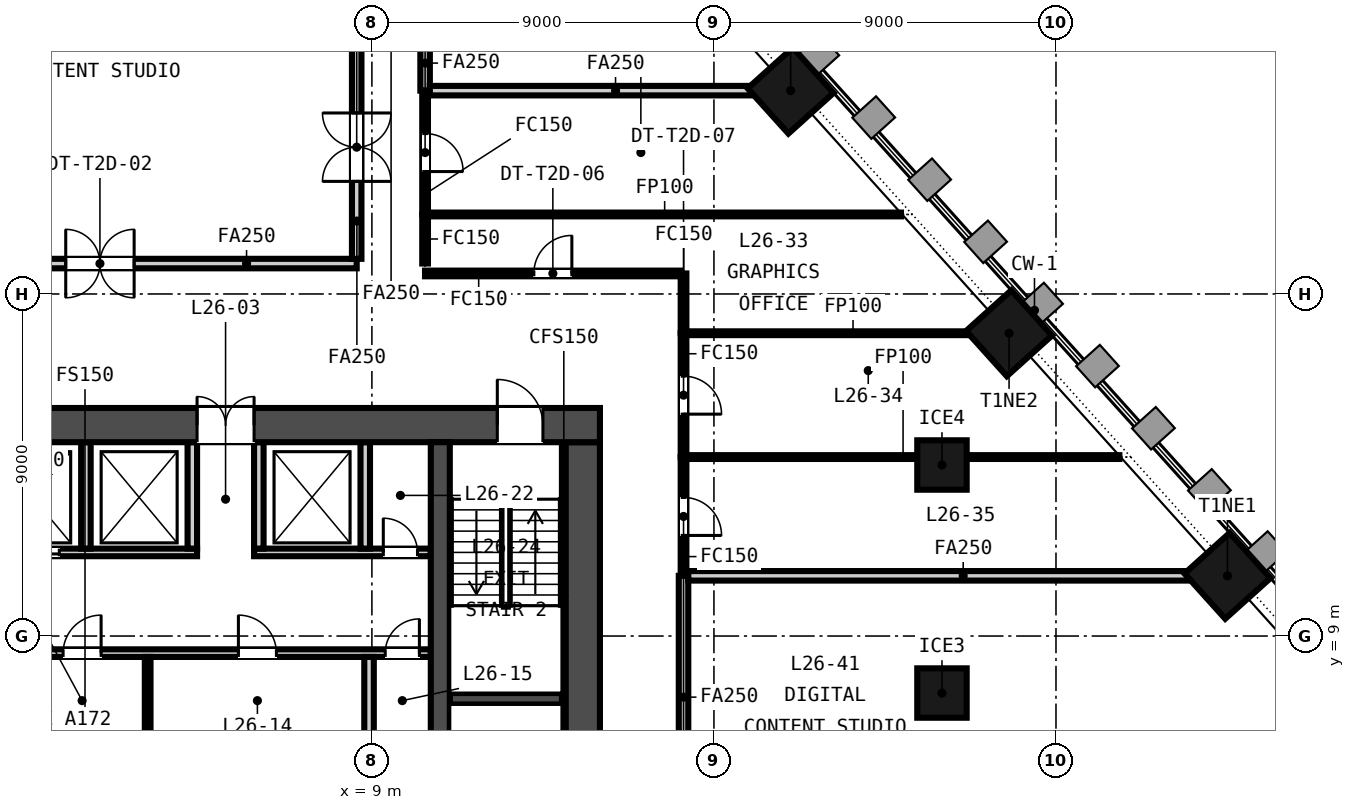
"""IFC4 building model, lengths in metres.
Left out: names, types, materials, properties, quantities, classifications, styles, units other than length and angle.
Written with IfcOpenShell. Run it as: python <this file> out.ifc"""

import sys

from ifc_helpers import new_model, si_unit, direction, frame, frame_2d, origin, origin_2d, place, context, subcontext, project, spatial, rectangle, extrude, element, fill, save


model = new_model("IFC4")
c1 = context("Model", 3, precision=1e-05, world=origin(), true_north=direction((0.0, 1.0)))
c2 = subcontext(c1, "Body", "Model", "MODEL_VIEW")
j1 = project(units=[si_unit("LENGTHUNIT", "METRE"), si_unit("PLANEANGLEUNIT", "RADIAN")], contexts=[c1])
p1 = place(None, origin())
s1 = spatial("IfcSite", under=j1, at=p1, CompositionType="ELEMENT")
p2 = place(p1, origin())
s2 = spatial("IfcBuilding", under=s1, at=p2, CompositionType="ELEMENT")
p3 = place(p2, frame((0.0, 0.0, 109.85)))
s3 = spatial("IfcBuildingStorey", under=s2, at=p3, CompositionType="ELEMENT", Elevation=109.85)
p4 = place(p3, frame((-15.0, 14.55, -0.15), z_axis=(0.0, 0.0, 1.0), x_axis=(1.0, 0.0, 0.0)))
e1 = element("IfcWall", 1, at=p4, inside=s3, PredefinedType="SOLIDWALL", context=c2, shape_type="SweptSolid", body=[
    extrude(rectangle(XDim=30.0, YDim=0.9, at=frame_2d((15.0, 0.0))), origin(), (0.0, 0.0, 1.0), 3.65),
])
p5 = place(p4, frame((9.25, 0.0, 0.15)))
e2 = element("IfcOpeningElement", 2, at=p5, cuts=e1, PredefinedType="OPENING", context=c2, shape_type="SweptSolid", body=[
    extrude(rectangle(XDim=1.5, YDim=2.1, at=frame_2d((0.75, 1.05))), frame((0.0, 0.46, 0.0), z_axis=(0.0, -1.0, 0.0), x_axis=(1.0, 0.0, 0.0)), (0.0, 0.0, 1.0), 0.92),
])
p6 = place(p4, frame((19.4, 0.0, 0.15)))
e3 = element("IfcOpeningElement", 3, at=p6, cuts=e1, PredefinedType="OPENING", context=c2, shape_type="SweptSolid", body=[
    extrude(rectangle(XDim=1.5, YDim=2.1, at=frame_2d((0.75, 1.05))), frame((0.0, 0.46, 0.0), z_axis=(0.0, -1.0, 0.0), x_axis=(1.0, 0.0, 0.0)), (0.0, 0.0, 1.0), 0.92),
])
p7 = place(p4, frame((1.5, 0.0, 0.15)))
e4 = element("IfcOpeningElement", 4, at=p7, cuts=e1, PredefinedType="OPENING", context=c2, shape_type="SweptSolid", body=[
    extrude(rectangle(XDim=1.2, YDim=2.1, at=frame_2d((0.6, 1.05))), frame((0.0, 0.46, 0.0), z_axis=(0.0, -1.0, 0.0), x_axis=(1.0, 0.0, 0.0)), (0.0, 0.0, 1.0), 0.92),
])
p8 = place(p4, frame((27.3, 0.0, 0.15)))
e5 = element("IfcOpeningElement", 5, at=p8, cuts=e1, PredefinedType="OPENING", context=c2, shape_type="SweptSolid", body=[
    extrude(rectangle(XDim=1.2, YDim=2.1, at=frame_2d((0.6, 1.05))), frame((0.0, 0.46, 0.0), z_axis=(0.0, -1.0, 0.0), x_axis=(1.0, 0.0, 0.0)), (0.0, 0.0, 1.0), 0.92),
])
p9 = place(p3, frame((14.55, 0.9, -0.15), z_axis=(0.0, 0.0, 1.0), x_axis=(0.0, 1.0, 0.0)))
e6 = element("IfcWall", 6, at=p9, inside=s3, PredefinedType="SOLIDWALL", context=c2, shape_type="SweptSolid", body=[
    extrude(rectangle(XDim=13.2, YDim=0.9, at=frame_2d((6.6, 0.0))), origin(), (0.0, 0.0, 1.0), 3.65),
])
p10 = place(p3, frame((10.8, 0.9, -0.15), z_axis=(0.0, 0.0, 1.0), x_axis=(0.0, 1.0, 0.0)))
e7 = element("IfcWall", 7, at=p10, inside=s3, PredefinedType="SOLIDWALL", context=c2, shape_type="SweptSolid", body=[
    extrude(rectangle(XDim=13.2, YDim=0.5, at=frame_2d((6.6, 0.0))), origin(), (0.0, 0.0, 1.0), 3.65),
])
for number, where, z_axis, x_axis in (
    (8, (31.513, 10.584, -0.15), (0.0, 0.0, 1.0), (-0.669, 0.743, 0.0)),
    (9, (25.765, 16.967, -0.15), (0.0, 0.0, 1.0), (-0.669, 0.743, 0.0)),
    (10, (20.018, 23.35, -0.15), (0.0, 0.0, 1.0), (-0.669, 0.743, 0.0)),
):
    element("IfcColumn", number, at=place(p3, frame(where, z_axis=z_axis, x_axis=x_axis)), inside=s3, PredefinedType="COLUMN", context=c2, shape_type="SweptSolid", body=[
        extrude(rectangle(XDim=1.6, YDim=1.6, at=origin_2d()), origin(), (0.0, 0.0, 1.0), 3.65),
    ])
for number, where, z_axis, x_axis in (
    (11, (24.0, 7.5, -0.15), (0.0, 0.0, 1.0), (1.0, 0.0, 0.0)),
    (12, (24.0, 13.5, -0.15), (0.0, 0.0, 1.0), (1.0, 0.0, 0.0)),
):
    element("IfcColumn", number, at=place(p3, frame(where, z_axis=z_axis, x_axis=x_axis)), inside=s3, PredefinedType="COLUMN", context=c2, shape_type="SweptSolid", body=[
        extrude(rectangle(XDim=1.3, YDim=1.3, at=origin_2d()), origin(), (0.0, 0.0, 1.0), 3.65),
    ])
p11 = place(p3, frame((-4.125, 8.55, 0.0), z_axis=(0.0, 0.0, 1.0), x_axis=(1.0, 0.0, 0.0)))
e13 = element("IfcWall", 13, at=p11, inside=s3, PredefinedType="PARTITIONING", context=c2, shape_type="SweptSolid", body=[
    extrude(rectangle(XDim=14.675, YDim=0.2, at=frame_2d((7.337, 0.0))), origin(), (0.0, 0.0, 1.0), 3.5),
])
p12 = place(p11, frame((1.413, 0.0, 0.0)))
e14 = element("IfcOpeningElement", 14, at=p12, cuts=e13, PredefinedType="OPENING", context=c2, shape_type="SweptSolid", body=[
    extrude(rectangle(XDim=1.0, YDim=2.1, at=frame_2d((0.5, 1.05))), frame((0.0, 0.11, 0.0), z_axis=(0.0, -1.0, 0.0), x_axis=(1.0, 0.0, 0.0)), (0.0, 0.0, 1.0), 0.22),
])
p13 = place(p11, frame((5.0, 0.0, 0.0)))
e15 = element("IfcOpeningElement", 15, at=p13, cuts=e13, PredefinedType="OPENING", context=c2, shape_type="SweptSolid", body=[
    extrude(rectangle(XDim=1.0, YDim=2.1, at=frame_2d((0.5, 1.05))), frame((0.0, 0.11, 0.0), z_axis=(0.0, -1.0, 0.0), x_axis=(1.0, 0.0, 0.0)), (0.0, 0.0, 1.0), 0.22),
])
p14 = place(p11, frame((9.613, 0.0, 0.0)))
e16 = element("IfcOpeningElement", 16, at=p14, cuts=e13, PredefinedType="OPENING", context=c2, shape_type="SweptSolid", body=[
    extrude(rectangle(XDim=1.0, YDim=2.1, at=frame_2d((0.5, 1.05))), frame((0.0, 0.11, 0.0), z_axis=(0.0, -1.0, 0.0), x_axis=(1.0, 0.0, 0.0)), (0.0, 0.0, 1.0), 0.22),
])
p15 = place(p11, frame((13.475, 0.0, 0.0)))
e17 = element("IfcOpeningElement", 17, at=p15, cuts=e13, PredefinedType="OPENING", context=c2, shape_type="SweptSolid", body=[
    extrude(rectangle(XDim=0.9, YDim=2.1, at=frame_2d((0.45, 1.05))), frame((0.0, 0.11, 0.0), z_axis=(0.0, -1.0, 0.0), x_axis=(1.0, 0.0, 0.0)), (0.0, 0.0, 1.0), 0.22),
])
p16 = place(p3, frame((-4.25, 11.2, 0.0), z_axis=(0.0, 0.0, 1.0), x_axis=(1.0, 0.0, 0.0)))
e18 = element("IfcWall", 18, at=p16, inside=s3, PredefinedType="PARTITIONING", context=c2, shape_type="SweptSolid", body=[
    extrude(rectangle(XDim=8.65, YDim=0.2, at=frame_2d((4.325, 0.0))), origin(), (0.0, 0.0, 1.0), 3.5),
])
p17 = place(p16, frame((0.825, 0.0, 0.0)))
e19 = element("IfcOpeningElement", 19, at=p17, cuts=e18, PredefinedType="OPENING", context=c2, shape_type="SweptSolid", body=[
    extrude(rectangle(XDim=1.4, YDim=2.1, at=frame_2d((0.7, 1.05))), frame((0.0, 0.11, 0.0), z_axis=(0.0, -1.0, 0.0), x_axis=(1.0, 0.0, 0.0)), (0.0, 0.0, 1.0), 0.22),
])
p18 = place(p16, frame((3.625, 0.0, 0.0)))
e20 = element("IfcOpeningElement", 20, at=p18, cuts=e18, PredefinedType="OPENING", context=c2, shape_type="SweptSolid", body=[
    extrude(rectangle(XDim=1.4, YDim=2.1, at=frame_2d((0.7, 1.05))), frame((0.0, 0.11, 0.0), z_axis=(0.0, -1.0, 0.0), x_axis=(1.0, 0.0, 0.0)), (0.0, 0.0, 1.0), 0.22),
])
p19 = place(p3, frame((5.9, 11.2, 0.0), z_axis=(0.0, 0.0, 1.0), x_axis=(1.0, 0.0, 0.0)))
e21 = element("IfcWall", 21, at=p19, inside=s3, PredefinedType="PARTITIONING", context=c2, shape_type="SweptSolid", body=[
    extrude(rectangle(XDim=4.65, YDim=0.2, at=frame_2d((2.325, 0.0))), origin(), (0.0, 0.0, 1.0), 3.5),
])
p20 = place(p19, frame((3.4, 0.0, 0.0)))
e22 = element("IfcOpeningElement", 22, at=p20, cuts=e21, PredefinedType="OPENING", context=c2, shape_type="SweptSolid", body=[
    extrude(rectangle(XDim=0.9, YDim=2.1, at=frame_2d((0.45, 1.05))), frame((0.0, 0.11, 0.0), z_axis=(0.0, -1.0, 0.0), x_axis=(1.0, 0.0, 0.0)), (0.0, 0.0, 1.0), 0.22),
])
p21 = place(p3, frame((3.1, 6.15, 0.0), z_axis=(0.0, 0.0, 1.0), x_axis=(0.0, 1.0, 0.0)))
e23 = element("IfcWall", 23, at=p21, inside=s3, PredefinedType="PARTITIONING", context=c2, shape_type="SweptSolid", body=[
    extrude(rectangle(XDim=2.3, YDim=0.15, at=frame_2d((1.15, 0.0))), origin(), (0.0, 0.0, 1.0), 3.5),
])
p22 = place(p3, frame((8.925, 6.15, 0.0), z_axis=(0.0, 0.0, 1.0), x_axis=(0.0, 1.0, 0.0)))
e24 = element("IfcWall", 24, at=p22, inside=s3, PredefinedType="PARTITIONING", context=c2, shape_type="SweptSolid", body=[
    extrude(rectangle(XDim=2.3, YDim=0.25, at=frame_2d((1.15, 0.0))), origin(), (0.0, 0.0, 1.0), 3.5),
])
for number, where, z_axis, x_axis in (
    (25, (1.475, 11.3, 0.0), (0.0, 0.0, 1.0), (0.0, 1.0, 0.0)),
    (26, (4.275, 11.3, 0.0), (0.0, 0.0, 1.0), (0.0, 1.0, 0.0)),
    (27, (6.025, 11.3, 0.0), (0.0, 0.0, 1.0), (0.0, 1.0, 0.0)),
    (28, (8.825, 11.3, 0.0), (0.0, 0.0, 1.0), (0.0, 1.0, 0.0)),
):
    element("IfcWall", number, at=place(p3, frame(where, z_axis=z_axis, x_axis=x_axis)), inside=s3, PredefinedType="PARTITIONING", context=c2, shape_type="SweptSolid", body=[
        extrude(rectangle(XDim=2.8, YDim=0.25, at=frame_2d((1.4, 0.0))), origin(), (0.0, 0.0, 1.0), 3.5),
    ])
p23 = place(p3, frame((11.05, 7.35, 0.0), z_axis=(0.0, 0.0, 1.0), x_axis=(1.0, 0.0, 0.0)))
e29 = element("IfcWall", 29, at=p23, inside=s3, PredefinedType="SOLIDWALL", context=c2, shape_type="SweptSolid", body=[
    extrude(rectangle(XDim=2.95, YDim=0.3, at=frame_2d((1.475, 0.0))), origin(), (0.0, 0.0, 1.0), 3.5),
])
p24 = place(p3, frame((14.05, 0.9, 0.0), z_axis=(0.0, 0.0, 1.0), x_axis=(0.0, 1.0, 0.0)))
e30 = element("IfcWall", 30, at=p24, inside=s3, PredefinedType="SOLIDWALL", context=c2, shape_type="SweptSolid", body=[
    extrude(rectangle(XDim=13.2, YDim=0.1, at=frame_2d((6.6, 0.0))), origin(), (0.0, 0.0, 1.0), 3.5),
])
p25 = place(p3, frame((10.4, 24.8, 0.0), z_axis=(0.0, 0.0, 1.0), x_axis=(0.0, -1.0, 0.0)))
e31 = element("IfcWall", 31, at=p25, inside=s3, PredefinedType="PARTITIONING", context=c2, shape_type="SweptSolid", body=[
    extrude(rectangle(XDim=1.45, YDim=0.25, at=frame_2d((0.725, 0.0))), origin(), (0.0, 0.0, 1.0), 2.741),
])
p26 = place(p3, frame((10.4, 23.35, 0.0), z_axis=(0.0, 0.0, 1.0), x_axis=(0.0, -1.0, 0.0)))
e32 = element("IfcWall", 32, at=p26, inside=s3, PredefinedType="PARTITIONING", context=c2, shape_type="SweptSolid", body=[
    extrude(rectangle(XDim=3.258, YDim=0.15, at=frame_2d((1.629, 0.0))), origin(), (0.0, 0.0, 1.0), 2.741),
])
p27 = place(p26, frame((1.129, 0.0, 0.0)))
e33 = element("IfcOpeningElement", 33, at=p27, cuts=e32, PredefinedType="OPENING", context=c2, shape_type="SweptSolid", body=[
    extrude(rectangle(XDim=1.0, YDim=2.1, at=frame_2d((0.5, 1.05))), frame((0.0, 0.085, 0.0), z_axis=(0.0, -1.0, 0.0), x_axis=(1.0, 0.0, 0.0)), (0.0, 0.0, 1.0), 0.17),
])
p28 = place(p3, frame((10.4, 20.092, 0.0), z_axis=(0.0, 0.0, 1.0), x_axis=(0.0, -1.0, 0.0)))
e34 = element("IfcWall", 34, at=p28, inside=s3, PredefinedType="PARTITIONING", context=c2, shape_type="SweptSolid", body=[
    extrude(rectangle(XDim=1.29, YDim=0.15, at=frame_2d((0.645, 0.0))), origin(), (0.0, 0.0, 1.0), 2.741),
])
p29 = place(p3, frame((17.2, 18.54, 0.0), z_axis=(0.0, 0.0, 1.0), x_axis=(0.0, -1.0, 0.0)))
e35 = element("IfcWall", 35, at=p29, inside=s3, PredefinedType="PARTITIONING", context=c2, shape_type="SweptSolid", body=[
    extrude(rectangle(XDim=1.573, YDim=0.15, at=frame_2d((0.787, 0.0))), origin(), (0.0, 0.0, 1.0), 2.741),
])
p30 = place(p3, frame((17.2, 16.967, 0.0), z_axis=(0.0, 0.0, 1.0), x_axis=(0.0, -1.0, 0.0)))
e36 = element("IfcWall", 36, at=p30, inside=s3, PredefinedType="PARTITIONING", context=c2, shape_type="SweptSolid", body=[
    extrude(rectangle(XDim=3.258, YDim=0.15, at=frame_2d((1.629, 0.0))), origin(), (0.0, 0.0, 1.0), 2.741),
])
p31 = place(p30, frame((1.129, 0.0, 0.0)))
e37 = element("IfcOpeningElement", 37, at=p31, cuts=e36, PredefinedType="OPENING", context=c2, shape_type="SweptSolid", body=[
    extrude(rectangle(XDim=1.0, YDim=2.1, at=frame_2d((0.5, 1.05))), frame((0.0, 0.085, 0.0), z_axis=(0.0, -1.0, 0.0), x_axis=(1.0, 0.0, 0.0)), (0.0, 0.0, 1.0), 0.17),
])
p32 = place(p3, frame((17.2, 13.709, 0.0), z_axis=(0.0, 0.0, 1.0), x_axis=(0.0, -1.0, 0.0)))
e38 = element("IfcWall", 38, at=p32, inside=s3, PredefinedType="PARTITIONING", context=c2, shape_type="SweptSolid", body=[
    extrude(rectangle(XDim=3.125, YDim=0.15, at=frame_2d((1.562, 0.0))), origin(), (0.0, 0.0, 1.0), 2.741),
])
p33 = place(p32, frame((1.062, 0.0, 0.0)))
e39 = element("IfcOpeningElement", 39, at=p33, cuts=e38, PredefinedType="OPENING", context=c2, shape_type="SweptSolid", body=[
    extrude(rectangle(XDim=1.0, YDim=2.1, at=frame_2d((0.5, 1.05))), frame((0.0, 0.085, 0.0), z_axis=(0.0, -1.0, 0.0), x_axis=(1.0, 0.0, 0.0)), (0.0, 0.0, 1.0), 0.17),
])
p34 = place(p3, frame((17.2, 10.584, 0.0), z_axis=(0.0, 0.0, 1.0), x_axis=(0.0, -1.0, 0.0)))
e40 = element("IfcWall", 40, at=p34, inside=s3, PredefinedType="PARTITIONING", context=c2, shape_type="SweptSolid", body=[
    extrude(rectangle(XDim=6.384, YDim=0.25, at=frame_2d((3.192, 0.0))), origin(), (0.0, 0.0, 1.0), 2.741),
])
p35 = place(p3, frame((-4.912, 18.8, 0.0), z_axis=(0.0, 0.0, 1.0), x_axis=(1.0, 0.0, 0.0)))
e41 = element("IfcWall", 41, at=p35, inside=s3, PredefinedType="PARTITIONING", context=c2, shape_type="SweptSolid", body=[
    extrude(rectangle(XDim=13.512, YDim=0.25, at=frame_2d((6.756, 0.0))), origin(), (0.0, 0.0, 1.0), 2.741),
])
p36 = place(p35, frame((5.856, 0.0, 0.0)))
e42 = element("IfcOpeningElement", 42, at=p36, cuts=e41, PredefinedType="OPENING", context=c2, shape_type="SweptSolid", body=[
    extrude(rectangle(XDim=1.8, YDim=2.1, at=frame_2d((0.9, 1.05))), frame((0.0, 0.135, 0.0), z_axis=(0.0, -1.0, 0.0), x_axis=(1.0, 0.0, 0.0)), (0.0, 0.0, 1.0), 0.27),
])
p37 = place(p3, frame((8.6, 18.925, 0.0), z_axis=(0.0, 0.0, 1.0), x_axis=(0.0, 1.0, 0.0)))
e43 = element("IfcWall", 43, at=p37, inside=s3, PredefinedType="PARTITIONING", context=c2, shape_type="SweptSolid", body=[
    extrude(rectangle(XDim=5.875, YDim=0.25, at=frame_2d((2.938, 0.0))), origin(), (0.0, 0.0, 1.0), 2.741),
])
p38 = place(p37, frame((2.038, 0.0, 0.0)))
e44 = element("IfcOpeningElement", 44, at=p38, cuts=e43, PredefinedType="OPENING", context=c2, shape_type="SweptSolid", body=[
    extrude(rectangle(XDim=1.8, YDim=2.1, at=frame_2d((0.9, 1.05))), frame((0.0, 0.135, 0.0), z_axis=(0.0, -1.0, 0.0), x_axis=(1.0, 0.0, 0.0)), (0.0, 0.0, 1.0), 0.27),
])
p39 = place(p3, frame((10.525, 23.35, 0.0), z_axis=(0.0, 0.0, 1.0), x_axis=(1.0, 0.0, 0.0)))
e45 = element("IfcWall", 45, at=p39, inside=s3, PredefinedType="PARTITIONING", context=c2, shape_type="SweptSolid", body=[
    extrude(rectangle(XDim=9.762, YDim=0.25, at=frame_2d((4.881, 0.0))), origin(), (0.0, 0.0, 1.0), 2.741),
])
p40 = place(p3, frame((10.475, 20.092, 0.0), z_axis=(0.0, 0.0, 1.0), x_axis=(1.0, 0.0, 0.0)))
e46 = element("IfcWall", 46, at=p40, inside=s3, PredefinedType="PARTITIONING", context=c2, shape_type="SweptSolid", body=[
    extrude(rectangle(XDim=12.446, YDim=0.1, at=frame_2d((6.223, 0.0))), origin(), (0.0, 0.0, 1.0), 2.741),
])
p41 = place(p3, frame((10.398, 18.54, 0.0), z_axis=(0.0, 0.0, 1.0), x_axis=(1.0, 0.0, 0.0)))
e47 = element("IfcWall", 47, at=p41, inside=s3, PredefinedType="PARTITIONING", context=c2, shape_type="SweptSolid", body=[
    extrude(rectangle(XDim=6.727, YDim=0.15, at=frame_2d((3.364, 0.0))), origin(), (0.0, 0.0, 1.0), 2.741),
])
p42 = place(p41, frame((2.864, 0.0, 0.0)))
e48 = element("IfcOpeningElement", 48, at=p42, cuts=e47, PredefinedType="OPENING", context=c2, shape_type="SweptSolid", body=[
    extrude(rectangle(XDim=1.0, YDim=2.1, at=frame_2d((0.5, 1.05))), frame((0.0, 0.085, 0.0), z_axis=(0.0, -1.0, 0.0), x_axis=(1.0, 0.0, 0.0)), (0.0, 0.0, 1.0), 0.17),
])
p43 = place(p3, frame((17.275, 16.967, 0.0), z_axis=(0.0, 0.0, 1.0), x_axis=(1.0, 0.0, 0.0)))
e49 = element("IfcWall", 49, at=p43, inside=s3, PredefinedType="PARTITIONING", context=c2, shape_type="SweptSolid", body=[
    extrude(rectangle(XDim=8.76, YDim=0.1, at=frame_2d((4.38, 0.0))), origin(), (0.0, 0.0, 1.0), 2.741),
])
p44 = place(p3, frame((17.275, 13.709, 0.0), z_axis=(0.0, 0.0, 1.0), x_axis=(1.0, 0.0, 0.0)))
e50 = element("IfcWall", 50, at=p44, inside=s3, PredefinedType="PARTITIONING", context=c2, shape_type="SweptSolid", body=[
    extrude(rectangle(XDim=11.393, YDim=0.1, at=frame_2d((5.697, 0.0))), origin(), (0.0, 0.0, 1.0), 2.741),
])
p45 = place(p3, frame((17.325, 10.584, 0.0), z_axis=(0.0, 0.0, 1.0), x_axis=(1.0, 0.0, 0.0)))
e51 = element("IfcWall", 51, at=p45, inside=s3, PredefinedType="PARTITIONING", context=c2, shape_type="SweptSolid", body=[
    extrude(rectangle(XDim=14.457, YDim=0.25, at=frame_2d((7.229, 0.0))), origin(), (0.0, 0.0, 1.0), 2.741),
])
p46 = place(p13, origin())
e52 = element("IfcDoor", 52, at=p46, inside=s3, OperationType="SINGLE_SWING_RIGHT", PredefinedType="DOOR", context=c2, shape_type="SweptSolid", body=[
    extrude(rectangle(XDim=1.0, YDim=2.1, at=frame_2d((0.5, 1.05))), frame((0.0, 0.025, 0.0), z_axis=(0.0, -1.0, 0.0), x_axis=(1.0, 0.0, 0.0)), (0.0, 0.0, 1.0), 0.05),
])
fill(e15, e52)
p47 = place(p14, origin())
e53 = element("IfcDoor", 53, at=p47, inside=s3, OperationType="SINGLE_SWING_LEFT", PredefinedType="DOOR", context=c2, shape_type="SweptSolid", body=[
    extrude(rectangle(XDim=1.0, YDim=2.1, at=frame_2d((0.5, 1.05))), frame((0.0, 0.025, 0.0), z_axis=(0.0, -1.0, 0.0), x_axis=(1.0, 0.0, 0.0)), (0.0, 0.0, 1.0), 0.05),
])
fill(e16, e53)
p48 = place(p15, origin())
e54 = element("IfcDoor", 54, at=p48, inside=s3, OperationType="SINGLE_SWING_RIGHT", PredefinedType="DOOR", context=c2, shape_type="SweptSolid", body=[
    extrude(rectangle(XDim=0.9, YDim=2.1, at=frame_2d((0.45, 1.05))), frame((0.0, 0.025, 0.0), z_axis=(0.0, -1.0, 0.0), x_axis=(1.0, 0.0, 0.0)), (0.0, 0.0, 1.0), 0.05),
])
fill(e17, e54)
p49 = place(p18, origin())
e55 = element("IfcDoor", 55, at=p49, inside=s3, OperationType="DOUBLE_DOOR_SLIDING", PredefinedType="DOOR", context=c2, shape_type="SweptSolid", body=[
    extrude(rectangle(XDim=1.4, YDim=2.1, at=frame_2d((0.7, 1.05))), frame((0.0, 0.025, 0.0), z_axis=(0.0, -1.0, 0.0), x_axis=(1.0, 0.0, 0.0)), (0.0, 0.0, 1.0), 0.05),
])
fill(e20, e55)
p50 = place(p20, origin())
e56 = element("IfcDoor", 56, at=p50, inside=s3, OperationType="SINGLE_SWING_LEFT", PredefinedType="DOOR", context=c2, shape_type="SweptSolid", body=[
    extrude(rectangle(XDim=0.9, YDim=2.1, at=frame_2d((0.45, 1.05))), frame((0.0, 0.025, 0.0), z_axis=(0.0, -1.0, 0.0), x_axis=(1.0, 0.0, 0.0)), (0.0, 0.0, 1.0), 0.05),
])
fill(e22, e56)
p51 = place(p6, origin())
e57 = element("IfcDoor", 57, at=p51, inside=s3, OperationType="DOUBLE_DOOR_SINGLE_SWING", PredefinedType="DOOR", context=c2, shape_type="SweptSolid", body=[
    extrude(rectangle(XDim=1.5, YDim=2.1, at=frame_2d((0.75, 1.05))), frame((0.0, 0.025, 0.0), z_axis=(0.0, -1.0, 0.0), x_axis=(1.0, 0.0, 0.0)), (0.0, 0.0, 1.0), 0.05),
])
fill(e3, e57)
p52 = place(p8, origin())
e58 = element("IfcDoor", 58, at=p52, inside=s3, OperationType="SINGLE_SWING_LEFT", PredefinedType="DOOR", context=c2, shape_type="SweptSolid", body=[
    extrude(rectangle(XDim=1.2, YDim=2.1, at=frame_2d((0.6, 1.05))), frame((0.0, 0.025, 0.0), z_axis=(0.0, -1.0, 0.0), x_axis=(1.0, 0.0, 0.0)), (0.0, 0.0, 1.0), 0.05),
])
fill(e5, e58)
p53 = place(p36, origin())
e59 = element("IfcDoor", 59, at=p53, inside=s3, OperationType="DOUBLE_DOOR_DOUBLE_SWING", PredefinedType="DOOR", context=c2, shape_type="SweptSolid", body=[
    extrude(rectangle(XDim=1.8, YDim=2.1, at=frame_2d((0.9, 1.05))), frame((0.0, 0.025, 0.0), z_axis=(0.0, -1.0, 0.0), x_axis=(1.0, 0.0, 0.0)), (0.0, 0.0, 1.0), 0.05),
])
fill(e42, e59)
p54 = place(p38, origin())
e60 = element("IfcDoor", 60, at=p54, inside=s3, OperationType="DOUBLE_DOOR_DOUBLE_SWING", PredefinedType="DOOR", context=c2, shape_type="SweptSolid", body=[
    extrude(rectangle(XDim=1.8, YDim=2.1, at=frame_2d((0.9, 1.05))), frame((0.0, 0.025, 0.0), z_axis=(0.0, -1.0, 0.0), x_axis=(1.0, 0.0, 0.0)), (0.0, 0.0, 1.0), 0.05),
])
fill(e44, e60)
p55 = place(p27, origin())
e61 = element("IfcDoor", 61, at=p55, inside=s3, OperationType="SINGLE_SWING_RIGHT", PredefinedType="DOOR", context=c2, shape_type="SweptSolid", body=[
    extrude(rectangle(XDim=1.0, YDim=2.1, at=frame_2d((0.5, 1.05))), frame((0.0, 0.025, 0.0), z_axis=(0.0, -1.0, 0.0), x_axis=(1.0, 0.0, 0.0)), (0.0, 0.0, 1.0), 0.05),
])
fill(e33, e61)
p56 = place(p42, origin())
e62 = element("IfcDoor", 62, at=p56, inside=s3, OperationType="SINGLE_SWING_RIGHT", PredefinedType="DOOR", context=c2, shape_type="SweptSolid", body=[
    extrude(rectangle(XDim=1.0, YDim=2.1, at=frame_2d((0.5, 1.05))), frame((0.0, 0.025, 0.0), z_axis=(0.0, -1.0, 0.0), x_axis=(1.0, 0.0, 0.0)), (0.0, 0.0, 1.0), 0.05),
])
fill(e48, e62)
p57 = place(p31, origin())
e63 = element("IfcDoor", 63, at=p57, inside=s3, OperationType="SINGLE_SWING_RIGHT", PredefinedType="DOOR", context=c2, shape_type="SweptSolid", body=[
    extrude(rectangle(XDim=1.0, YDim=2.1, at=frame_2d((0.5, 1.05))), frame((0.0, 0.025, 0.0), z_axis=(0.0, -1.0, 0.0), x_axis=(1.0, 0.0, 0.0)), (0.0, 0.0, 1.0), 0.05),
])
fill(e37, e63)
p58 = place(p33, origin())
e64 = element("IfcDoor", 64, at=p58, inside=s3, OperationType="SINGLE_SWING_RIGHT", PredefinedType="DOOR", context=c2, shape_type="SweptSolid", body=[
    extrude(rectangle(XDim=1.0, YDim=2.1, at=frame_2d((0.5, 1.05))), frame((0.0, 0.025, 0.0), z_axis=(0.0, -1.0, 0.0), x_axis=(1.0, 0.0, 0.0)), (0.0, 0.0, 1.0), 0.05),
])
fill(e39, e64)
save(model, sys.argv[1])
